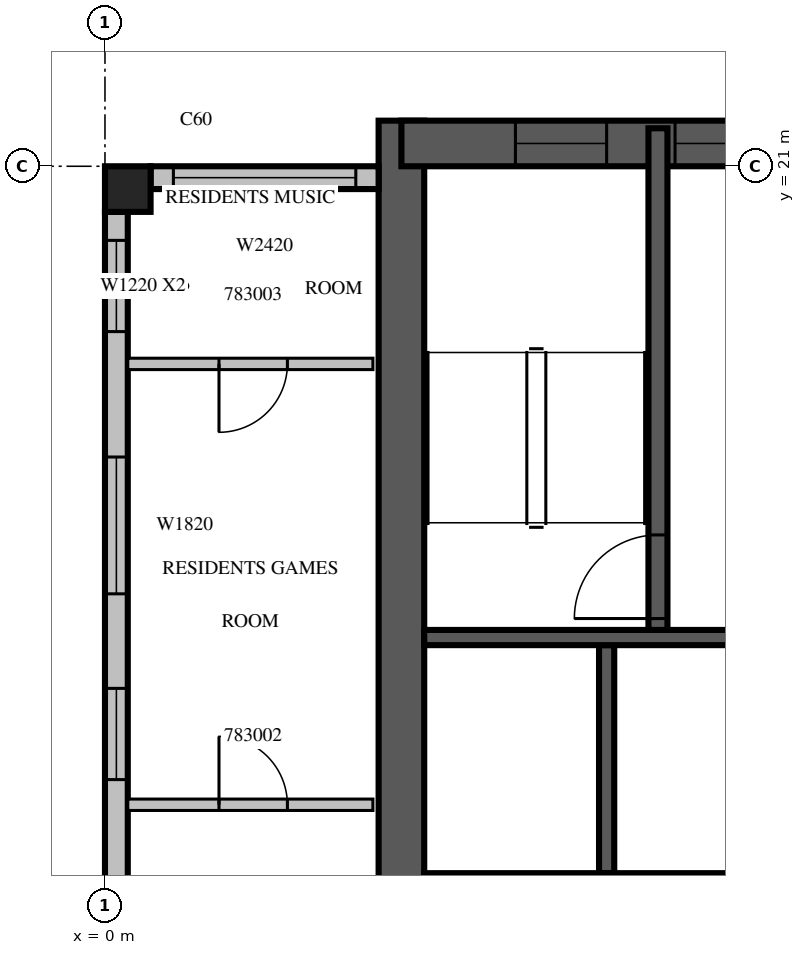
"""IFC4 building model, lengths in metres.
Left out: names, types, materials, properties, quantities, classifications, styles, units other than length and angle.
Written with IfcOpenShell. Run it as: python <this file> out.ifc"""

import sys

from ifc_helpers import new_model, si_unit, direction, frame, frame_2d, origin, origin_2d, place, context, subcontext, project, spatial, rectangle, extrude, source, transform, mapped, element, fill, save


model = new_model("IFC4")
c1 = context("Model", 3, precision=1e-05, world=origin(), true_north=direction((0.0, 1.0)))
c2 = subcontext(c1, "Body", "Model", "MODEL_VIEW")
j1 = project(units=[si_unit("LENGTHUNIT", "METRE"), si_unit("PLANEANGLEUNIT", "RADIAN")], contexts=[c1])
p1 = place(None, origin())
s1 = spatial("IfcSite", under=j1, at=p1, CompositionType="ELEMENT")
p2 = place(p1, origin())
s2 = spatial("IfcBuilding", under=s1, at=p2, CompositionType="ELEMENT")
p3 = place(p2, frame((0.0, 0.0, 351.0)))
s3 = spatial("IfcBuildingStorey", under=s2, at=p3, CompositionType="ELEMENT", Elevation=351.0)
m1 = source(origin(), c2, "Body", "SweptSolid", [
    extrude(rectangle(XDim=0.6, YDim=0.6, at=origin_2d()), origin(), (0.0, 0.0, 1.0), 3.5),
])
p4 = place(p3, frame((0.3, 20.7, 0.0), z_axis=(0.0, 0.0, 1.0), x_axis=(1.0, 0.0, 0.0)))
e1 = element("IfcColumn", 1, at=p4, inside=s3, PredefinedType="COLUMN", context=c2, shape_type="MappedRepresentation", body=[
    mapped(m1, transform((0.0, 0.0, 0.0), scale=1.0)),
])
m2 = source(origin(), c2, "Body", "SweptSolid", [
    extrude(rectangle(XDim=17.4, YDim=0.6, at=frame_2d((8.7, 0.0))), origin(), (0.0, 0.0, 1.0), 3.5),
])
p5 = place(p3, frame((3.9, 4.2, 0.0), z_axis=(0.0, 0.0, 1.0), x_axis=(0.0, 1.0, 0.0)))
e2 = element("IfcWall", 2, at=p5, inside=s3, PredefinedType="SHEAR", context=c2, shape_type="MappedRepresentation", body=[
    mapped(m2, transform((0.0, 0.0, 0.0), scale=1.0)),
])
m3 = source(origin(), c2, "Body", "SweptSolid", [
    extrude(rectangle(XDim=2.2, YDim=2.1, at=frame_2d((1.1, 1.05))), frame((0.0, 0.31, 0.0), z_axis=(0.0, -1.0, 0.0), x_axis=(1.0, 0.0, 0.0)), (0.0, 0.0, 1.0), 0.62),
])
p6 = place(p5, frame((4.2, 0.0, 0.0)))
e3 = element("IfcOpeningElement", 3, at=p6, cuts=e2, PredefinedType="OPENING", context=c2, shape_type="MappedRepresentation", body=[
    mapped(m3, transform((0.0, 0.0, 0.0), scale=1.0)),
])
m4 = source(origin(), c2, "Body", "SweptSolid", [
    extrude(rectangle(XDim=6.6, YDim=0.6, at=frame_2d((3.3, 0.0))), origin(), (0.0, 0.0, 1.0), 3.5),
])
p7 = place(p3, frame((3.9, 21.3, 0.0), z_axis=(0.0, 0.0, 1.0), x_axis=(1.0, 0.0, 0.0)))
e4 = element("IfcWall", 4, at=p7, inside=s3, PredefinedType="SHEAR", context=c2, shape_type="MappedRepresentation", body=[
    mapped(m4, transform((0.0, 0.0, 0.0), scale=1.0)),
])
m5 = source(origin(), c2, "Body", "SweptSolid", [
    extrude(rectangle(XDim=1.2, YDim=2.4, at=frame_2d((0.6, 1.2))), frame((0.0, 0.31, 0.0), z_axis=(0.0, -1.0, 0.0), x_axis=(1.0, 0.0, 0.0)), (0.0, 0.0, 1.0), 0.62),
])
p8 = place(p7, frame((1.5, 0.0, 0.6)))
e5 = element("IfcOpeningElement", 5, at=p8, cuts=e4, PredefinedType="OPENING", context=c2, shape_type="MappedRepresentation", body=[
    mapped(m5, transform((0.0, 0.0, 0.0), scale=1.0)),
])
p9 = place(p7, frame((3.6, 0.0, 0.6)))
e6 = element("IfcOpeningElement", 6, at=p9, cuts=e4, PredefinedType="OPENING", context=c2, shape_type="MappedRepresentation", body=[
    mapped(m5, transform((0.0, 0.0, 0.0), scale=1.0)),
])
m6 = source(origin(), c2, "Body", "SweptSolid", [
    extrude(rectangle(XDim=3.0, YDim=0.3, at=frame_2d((1.5, 0.0))), origin(), (0.0, 0.0, 1.0), 3.1),
])
p10 = place(p3, frame((3.6, 20.85, 0.0), z_axis=(0.0, 0.0, 1.0), x_axis=(-1.0, 0.0, 0.0)))
e7 = element("IfcWall", 7, at=p10, inside=s3, PredefinedType="STANDARD", context=c2, shape_type="MappedRepresentation", body=[
    mapped(m6, transform((0.0, 0.0, 0.0), scale=1.0)),
])
m7 = source(origin(), c2, "Body", "SweptSolid", [
    extrude(rectangle(XDim=2.4, YDim=2.0, at=frame_2d((1.2, 1.0))), frame((0.0, 0.16, 0.0), z_axis=(0.0, -1.0, 0.0), x_axis=(1.0, 0.0, 0.0)), (0.0, 0.0, 1.0), 0.32),
])
p11 = place(p10, frame((0.3, 0.0, 0.6)))
e8 = element("IfcOpeningElement", 8, at=p11, cuts=e7, PredefinedType="OPENING", context=c2, shape_type="MappedRepresentation", body=[
    mapped(m7, transform((0.0, 0.0, 0.0), scale=1.0)),
])
m8 = source(origin(), c2, "Body", "SweptSolid", [
    extrude(rectangle(XDim=9.6, YDim=0.3, at=frame_2d((4.8, 0.0))), origin(), (0.0, 0.0, 1.0), 3.1),
])
p12 = place(p3, frame((0.15, 20.4, 0.0), z_axis=(0.0, 0.0, 1.0), x_axis=(0.0, -1.0, 0.0)))
e9 = element("IfcWall", 9, at=p12, inside=s3, PredefinedType="STANDARD", context=c2, shape_type="MappedRepresentation", body=[
    mapped(m8, transform((0.0, 0.0, 0.0), scale=1.0)),
])
m9 = source(origin(), c2, "Body", "SweptSolid", [
    extrude(rectangle(XDim=1.2, YDim=2.0, at=frame_2d((0.6, 1.0))), frame((0.0, 0.16, 0.0), z_axis=(0.0, -1.0, 0.0), x_axis=(1.0, 0.0, 0.0)), (0.0, 0.0, 1.0), 0.32),
])
p13 = place(p12, frame((0.375, 0.0, 0.6)))
e10 = element("IfcOpeningElement", 10, at=p13, cuts=e9, PredefinedType="OPENING", context=c2, shape_type="MappedRepresentation", body=[
    mapped(m9, transform((0.0, 0.0, 0.0), scale=1.0)),
])
m10 = source(origin(), c2, "Body", "SweptSolid", [
    extrude(rectangle(XDim=1.8, YDim=2.0, at=frame_2d((0.9, 1.0))), frame((0.0, 0.16, 0.0), z_axis=(0.0, -1.0, 0.0), x_axis=(1.0, 0.0, 0.0)), (0.0, 0.0, 1.0), 0.32),
])
p14 = place(p12, frame((3.225, 0.0, 0.6)))
e11 = element("IfcOpeningElement", 11, at=p14, cuts=e9, PredefinedType="OPENING", context=c2, shape_type="MappedRepresentation", body=[
    mapped(m10, transform((0.0, 0.0, 0.0), scale=1.0)),
])
p15 = place(p12, frame((6.269, 0.0, 0.6)))
e12 = element("IfcOpeningElement", 12, at=p15, cuts=e9, PredefinedType="OPENING", context=c2, shape_type="MappedRepresentation", body=[
    mapped(m9, transform((0.0, 0.0, 0.0), scale=1.0)),
])
m11 = source(origin(), c2, "Body", "SweptSolid", [
    extrude(rectangle(XDim=3.0, YDim=0.2, at=frame_2d((1.5, 0.0))), origin(), (0.0, 0.0, 1.0), 3.5),
])
p16 = place(p3, frame((6.6, 11.7, 0.0), z_axis=(0.0, 0.0, 1.0), x_axis=(0.0, 1.0, 0.0)))
e13 = element("IfcWall", 13, at=p16, inside=s3, PredefinedType="SOLIDWALL", context=c2, shape_type="MappedRepresentation", body=[
    mapped(m11, transform((0.0, 0.0, 0.0), scale=1.0)),
])
m12 = source(origin(), c2, "Body", "SweptSolid", [
    extrude(rectangle(XDim=4.8, YDim=0.2, at=frame_2d((2.4, 0.0))), origin(), (0.0, 0.0, 1.0), 3.5),
])
p17 = place(p3, frame((4.2, 11.6, 0.0), z_axis=(0.0, 0.0, 1.0), x_axis=(1.0, 0.0, 0.0)))
e14 = element("IfcWall", 14, at=p17, inside=s3, PredefinedType="SOLIDWALL", context=c2, shape_type="MappedRepresentation", body=[
    mapped(m12, transform((0.0, 0.0, 0.0), scale=1.0)),
])
m13 = source(origin(), c2, "Body", "SweptSolid", [
    extrude(rectangle(XDim=1.1, YDim=2.1, at=frame_2d((0.55, 1.05))), frame((0.0, 0.11, 0.0), z_axis=(0.0, -1.0, 0.0), x_axis=(1.0, 0.0, 0.0)), (0.0, 0.0, 1.0), 0.22),
])
p18 = place(p17, frame((0.65, 0.0, 0.0)))
e15 = element("IfcOpeningElement", 15, at=p18, cuts=e14, PredefinedType="OPENING", context=c2, shape_type="MappedRepresentation", body=[
    mapped(m13, transform((0.0, 0.0, 0.0), scale=1.0)),
])
p19 = place(p17, frame((3.05, 0.0, 0.0)))
e16 = element("IfcOpeningElement", 16, at=p19, cuts=e14, PredefinedType="OPENING", context=c2, shape_type="MappedRepresentation", body=[
    mapped(m13, transform((0.0, 0.0, 0.0), scale=1.0)),
])
p20 = place(p3, frame((4.2, 14.8, 0.0), z_axis=(0.0, 0.0, 1.0), x_axis=(1.0, 0.0, 0.0)))
e17 = element("IfcWall", 17, at=p20, inside=s3, PredefinedType="SOLIDWALL", context=c2, shape_type="MappedRepresentation", body=[
    mapped(m12, transform((0.0, 0.0, 0.0), scale=1.0)),
])
m14 = source(origin(), c2, "Body", "SweptSolid", [
    extrude(rectangle(XDim=6.6, YDim=0.25, at=frame_2d((3.3, 0.0))), origin(), (0.0, 0.0, 1.0), 3.1),
])
p21 = place(p3, frame((7.275, 14.9, 0.0), z_axis=(0.0, 0.0, 1.0), x_axis=(0.0, 1.0, 0.0)))
e18 = element("IfcWall", 18, at=p21, inside=s3, PredefinedType="SOLIDWALL", context=c2, shape_type="MappedRepresentation", body=[
    mapped(m14, transform((0.0, 0.0, 0.0), scale=1.0)),
])
m15 = source(origin(), c2, "Body", "SweptSolid", [
    extrude(rectangle(XDim=1.1, YDim=2.1, at=frame_2d((0.55, 1.05))), frame((0.0, 0.135, 0.0), z_axis=(0.0, -1.0, 0.0), x_axis=(1.0, 0.0, 0.0)), (0.0, 0.0, 1.0), 0.27),
])
p22 = place(p21, frame((0.15, 0.0, 0.0)))
e19 = element("IfcOpeningElement", 19, at=p22, cuts=e18, PredefinedType="OPENING", context=c2, shape_type="MappedRepresentation", body=[
    mapped(m15, transform((0.0, 0.0, 0.0), scale=1.0)),
])
m16 = source(origin(), c2, "Body", "SweptSolid", [
    extrude(rectangle(XDim=3.225, YDim=0.15, at=frame_2d((1.613, 0.0))), origin(), (0.0, 0.0, 1.0), 3.1),
])
p23 = place(p3, frame((0.3, 12.6, 0.0), z_axis=(0.0, 0.0, 1.0), x_axis=(1.0, 0.0, 0.0)))
e20 = element("IfcWall", 20, at=p23, inside=s3, PredefinedType="PARTITIONING", context=c2, shape_type="MappedRepresentation", body=[
    mapped(m16, transform((0.0, 0.0, 0.0), scale=1.0)),
])
m17 = source(origin(), c2, "Body", "SweptSolid", [
    extrude(rectangle(XDim=0.9, YDim=2.1, at=frame_2d((0.45, 1.05))), frame((0.0, 0.085, 0.0), z_axis=(0.0, -1.0, 0.0), x_axis=(1.0, 0.0, 0.0)), (0.0, 0.0, 1.0), 0.17),
])
p24 = place(p23, frame((1.2, 0.0, 0.0)))
e21 = element("IfcOpeningElement", 21, at=p24, cuts=e20, PredefinedType="OPENING", context=c2, shape_type="MappedRepresentation", body=[
    mapped(m17, transform((0.0, 0.0, 0.0), scale=1.0)),
])
p25 = place(p3, frame((0.3, 18.4, 0.0), z_axis=(0.0, 0.0, 1.0), x_axis=(1.0, 0.0, 0.0)))
e22 = element("IfcWall", 22, at=p25, inside=s3, PredefinedType="PARTITIONING", context=c2, shape_type="MappedRepresentation", body=[
    mapped(m16, transform((0.0, 0.0, 0.0), scale=1.0)),
])
p26 = place(p25, frame((1.2, 0.0, 0.0)))
e23 = element("IfcOpeningElement", 23, at=p26, cuts=e22, PredefinedType="OPENING", context=c2, shape_type="MappedRepresentation", body=[
    mapped(m17, transform((0.0, 0.0, 0.0), scale=1.0)),
])
m18 = source(origin(), c2, "Body", "SweptSolid", [
    extrude(rectangle(XDim=2.4, YDim=2.0, at=frame_2d((1.2, 1.0))), frame((0.0, 0.03, 0.0), z_axis=(0.0, -1.0, 0.0), x_axis=(1.0, 0.0, 0.0)), (0.0, 0.0, 1.0), 0.06),
])
p27 = place(p11, origin())
e24 = element("IfcWindow", 24, at=p27, inside=s3, PartitioningType="SINGLE_PANEL", PredefinedType="WINDOW", context=c2, shape_type="MappedRepresentation", body=[
    mapped(m18, transform((0.0, 0.0, 0.0), scale=1.0)),
])
fill(e8, e24)
m19 = source(origin(), c2, "Body", "SweptSolid", [
    extrude(rectangle(XDim=1.2, YDim=2.0, at=frame_2d((0.6, 1.0))), frame((0.0, 0.03, 0.0), z_axis=(0.0, -1.0, 0.0), x_axis=(1.0, 0.0, 0.0)), (0.0, 0.0, 1.0), 0.06),
])
p28 = place(p13, origin())
e25 = element("IfcWindow", 25, at=p28, inside=s3, PartitioningType="SINGLE_PANEL", PredefinedType="WINDOW", context=c2, shape_type="MappedRepresentation", body=[
    mapped(m19, transform((0.0, 0.0, 0.0), scale=1.0)),
])
fill(e10, e25)
m20 = source(origin(), c2, "Body", "SweptSolid", [
    extrude(rectangle(XDim=1.8, YDim=2.0, at=frame_2d((0.9, 1.0))), frame((0.0, 0.03, 0.0), z_axis=(0.0, -1.0, 0.0), x_axis=(1.0, 0.0, 0.0)), (0.0, 0.0, 1.0), 0.06),
])
p29 = place(p14, origin())
e26 = element("IfcWindow", 26, at=p29, inside=s3, PartitioningType="SINGLE_PANEL", PredefinedType="WINDOW", context=c2, shape_type="MappedRepresentation", body=[
    mapped(m20, transform((0.0, 0.0, 0.0), scale=1.0)),
])
fill(e11, e26)
p30 = place(p15, origin())
e27 = element("IfcWindow", 27, at=p30, inside=s3, PartitioningType="SINGLE_PANEL", PredefinedType="WINDOW", context=c2, shape_type="MappedRepresentation", body=[
    mapped(m19, transform((0.0, 0.0, 0.0), scale=1.0)),
])
fill(e12, e27)
m21 = source(origin(), c2, "Body", "SweptSolid", [
    extrude(rectangle(XDim=1.1, YDim=2.1, at=frame_2d((0.55, 1.05))), frame((0.0, 0.025, 0.0), z_axis=(0.0, -1.0, 0.0), x_axis=(1.0, 0.0, 0.0)), (0.0, 0.0, 1.0), 0.05),
])
p31 = place(p22, origin())
e28 = element("IfcDoor", 28, at=p31, inside=s3, OperationType="SINGLE_SWING_LEFT", PredefinedType="DOOR", context=c2, shape_type="MappedRepresentation", body=[
    mapped(m21, transform((0.0, 0.0, 0.0), scale=1.0)),
])
fill(e19, e28)
m22 = source(origin(), c2, "Body", "SweptSolid", [
    extrude(rectangle(XDim=1.2, YDim=2.4, at=frame_2d((0.6, 1.2))), frame((0.0, 0.03, 0.0), z_axis=(0.0, -1.0, 0.0), x_axis=(1.0, 0.0, 0.0)), (0.0, 0.0, 1.0), 0.06),
])
p32 = place(p8, origin())
e29 = element("IfcWindow", 29, at=p32, inside=s3, PartitioningType="SINGLE_PANEL", PredefinedType="WINDOW", context=c2, shape_type="MappedRepresentation", body=[
    mapped(m22, transform((0.0, 0.0, 0.0), scale=1.0)),
])
fill(e5, e29)
p33 = place(p9, origin())
e30 = element("IfcWindow", 30, at=p33, inside=s3, PartitioningType="SINGLE_PANEL", PredefinedType="WINDOW", context=c2, shape_type="MappedRepresentation", body=[
    mapped(m22, transform((0.0, 0.0, 0.0), scale=1.0)),
])
fill(e6, e30)
m23 = source(origin(), c2, "Body", "SweptSolid", [
    extrude(rectangle(XDim=0.9, YDim=2.1, at=frame_2d((0.45, 1.05))), frame((0.0, 0.025, 0.0), z_axis=(0.0, -1.0, 0.0), x_axis=(1.0, 0.0, 0.0)), (0.0, 0.0, 1.0), 0.05),
])
p34 = place(p24, origin())
e31 = element("IfcDoor", 31, at=p34, inside=s3, OperationType="SINGLE_SWING_LEFT", PredefinedType="DOOR", context=c2, shape_type="MappedRepresentation", body=[
    mapped(m23, transform((0.0, 0.0, 0.0), scale=1.0)),
])
fill(e21, e31)
p35 = place(p26, origin())
e32 = element("IfcDoor", 32, at=p35, inside=s3, OperationType="SINGLE_SWING_RIGHT", PredefinedType="DOOR", context=c2, shape_type="MappedRepresentation", body=[
    mapped(m23, transform((0.0, 0.0, 0.0), scale=1.0)),
])
fill(e23, e32)
save(model, sys.argv[1])
